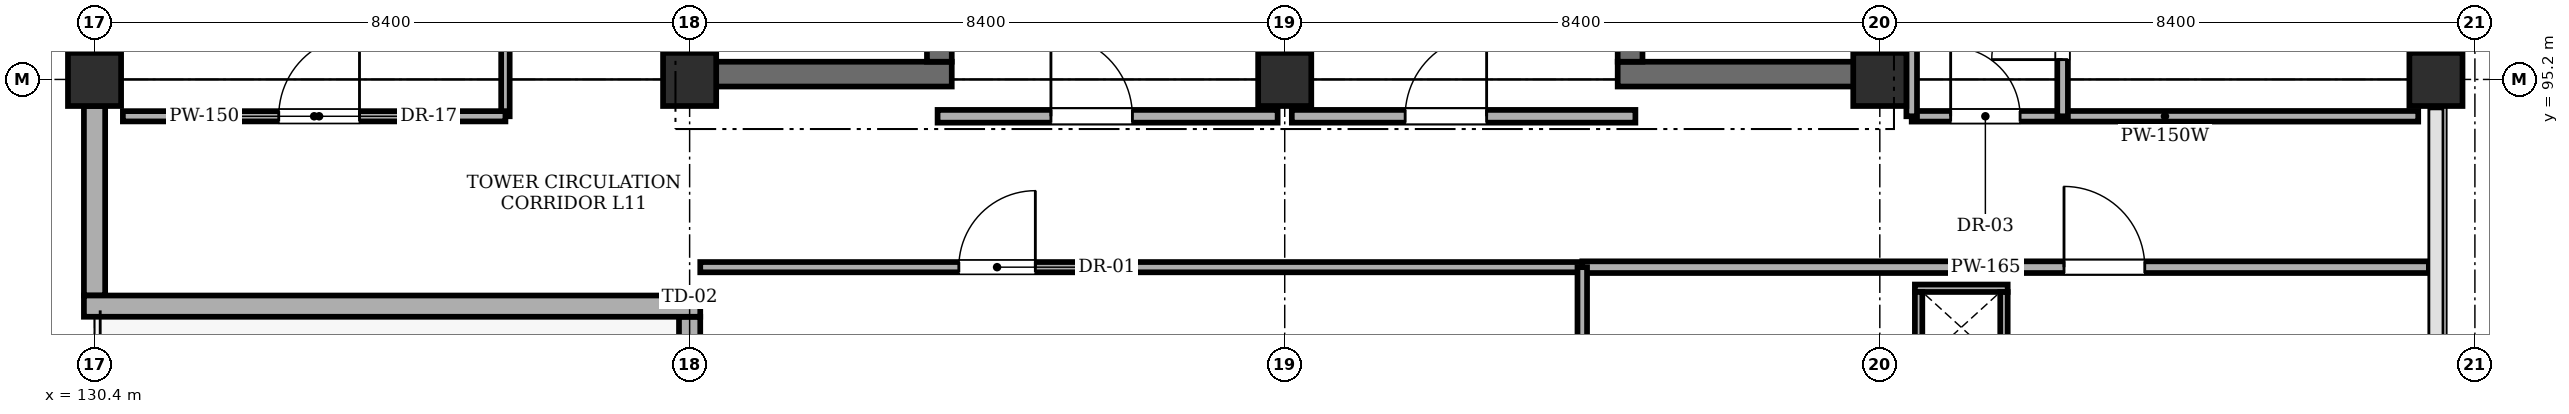
"""IFC4 building model, lengths in metres.
Left out: names, types, materials, properties, quantities, classifications, styles, units other than length and angle.
Written with IfcOpenShell. Run it as: python <this file> out.ifc"""

import sys

from ifc_helpers import new_model, si_unit, direction, frame, frame_2d, origin, origin_2d, place, context, subcontext, project, spatial, rectangle, extrude, element, fill, save


model = new_model("IFC4")
c1 = context("Model", 3, precision=1e-05, world=origin(), true_north=direction((0.0, 1.0)))
c2 = subcontext(c1, "Body", "Model", "MODEL_VIEW")
j1 = project(units=[si_unit("LENGTHUNIT", "METRE"), si_unit("PLANEANGLEUNIT", "RADIAN")], contexts=[c1])
p1 = place(None, origin())
s1 = spatial("IfcSite", under=j1, at=p1, CompositionType="ELEMENT")
p2 = place(p1, origin())
s2 = spatial("IfcBuilding", under=s1, at=p2, CompositionType="ELEMENT")
p3 = place(p2, frame((0.0, 0.0, 44.4)))
s3 = spatial("IfcBuildingStorey", under=s2, at=p3, CompositionType="ELEMENT", Elevation=44.4)
for number, where, z_axis, x_axis in (
    (1, (130.4, 95.2, 0.0), (0.0, 0.0, 1.0), (1.0, 0.0, 0.0)),
    (2, (138.8, 95.2, 0.0), (0.0, 0.0, 1.0), (1.0, 0.0, 0.0)),
    (3, (147.2, 95.2, 0.0), (0.0, 0.0, 1.0), (1.0, 0.0, 0.0)),
    (4, (155.6, 95.2, 0.0), (0.0, 0.0, 1.0), (1.0, 0.0, 0.0)),
    (5, (163.45, 95.2, 0.0), (0.0, 0.0, 1.0), (1.0, 0.0, 0.0)),
):
    element("IfcColumn", number, at=place(p3, frame(where, z_axis=z_axis, x_axis=x_axis)), inside=s3, PredefinedType="COLUMN", context=c2, shape_type="SweptSolid", body=[
        extrude(rectangle(XDim=0.75, YDim=0.75, at=origin_2d()), origin(), (0.0, 0.0, 1.0), 4.01),
    ])
p4 = place(p3, frame((138.7, 95.275, 0.0), z_axis=(0.0, 0.0, 1.0), x_axis=(1.0, 0.0, 0.0)))
e6 = element("IfcWall", 6, at=p4, inside=s3, PredefinedType="SHEAR", context=c2, shape_type="SweptSolid", body=[
    extrude(rectangle(XDim=3.8, YDim=0.35, at=frame_2d((1.9, 0.0))), origin(), (0.0, 0.0, 1.0), 4.01),
])
p5 = place(p3, frame((138.875, 95.45, 0.0), z_axis=(0.0, 0.0, 1.0), x_axis=(0.0, 1.0, 0.0)))
e7 = element("IfcWall", 7, at=p5, inside=s3, PredefinedType="SHEAR", context=c2, shape_type="SweptSolid", body=[
    extrude(rectangle(XDim=7.9, YDim=0.35, at=frame_2d((3.95, 0.0))), origin(), (0.0, 0.0, 1.0), 4.01),
])
p6 = place(p3, frame((142.325, 95.45, 0.0), z_axis=(0.0, 0.0, 1.0), x_axis=(0.0, 1.0, 0.0)))
e8 = element("IfcWall", 8, at=p6, inside=s3, PredefinedType="SHEAR", context=c2, shape_type="SweptSolid", body=[
    extrude(rectangle(XDim=7.9, YDim=0.35, at=frame_2d((3.95, 0.0))), origin(), (0.0, 0.0, 1.0), 4.01),
])
p7 = place(p6, frame((0.22, 0.0, 0.0)))
e9 = element("IfcOpeningElement", 9, at=p7, cuts=e8, PredefinedType="OPENING", context=c2, shape_type="SweptSolid", body=[
    extrude(rectangle(XDim=1.15, YDim=2.15, at=frame_2d((0.575, 1.075))), frame((0.0, 0.185, 0.0), z_axis=(0.0, -1.0, 0.0), x_axis=(1.0, 0.0, 0.0)), (0.0, 0.0, 1.0), 0.37),
])
p8 = place(p3, frame((151.9, 95.275, 0.0), z_axis=(0.0, 0.0, 1.0), x_axis=(1.0, 0.0, 0.0)))
e10 = element("IfcWall", 10, at=p8, inside=s3, PredefinedType="SHEAR", context=c2, shape_type="SweptSolid", body=[
    extrude(rectangle(XDim=3.8, YDim=0.35, at=frame_2d((1.9, 0.0))), origin(), (0.0, 0.0, 1.0), 4.01),
])
p9 = place(p3, frame((152.075, 95.45, 0.0), z_axis=(0.0, 0.0, 1.0), x_axis=(0.0, 1.0, 0.0)))
e11 = element("IfcWall", 11, at=p9, inside=s3, PredefinedType="SHEAR", context=c2, shape_type="SweptSolid", body=[
    extrude(rectangle(XDim=7.9, YDim=0.35, at=frame_2d((3.95, 0.0))), origin(), (0.0, 0.0, 1.0), 4.01),
])
p10 = place(p9, frame((0.35, 0.0, 0.0)))
e12 = element("IfcOpeningElement", 12, at=p10, cuts=e11, PredefinedType="OPENING", context=c2, shape_type="SweptSolid", body=[
    extrude(rectangle(XDim=1.15, YDim=2.15, at=frame_2d((0.575, 1.075))), frame((0.0, 0.185, 0.0), z_axis=(0.0, -1.0, 0.0), x_axis=(1.0, 0.0, 0.0)), (0.0, 0.0, 1.0), 0.37),
])
p11 = place(p3, frame((155.525, 95.45, 0.0), z_axis=(0.0, 0.0, 1.0), x_axis=(0.0, 1.0, 0.0)))
e13 = element("IfcWall", 13, at=p11, inside=s3, PredefinedType="SHEAR", context=c2, shape_type="SweptSolid", body=[
    extrude(rectangle(XDim=7.9, YDim=0.35, at=frame_2d((3.95, 0.0))), origin(), (0.0, 0.0, 1.0), 4.01),
])
p12 = place(p3, frame((163.45, 103.225, 0.0), z_axis=(0.0, 0.0, 1.0), x_axis=(0.0, -1.0, 0.0)))
e14 = element("IfcWall", 14, at=p12, inside=s3, PredefinedType="STANDARD", context=c2, shape_type="SweptSolid", body=[
    extrude(rectangle(XDim=7.65, YDim=0.3, at=frame_2d((3.825, 0.0))), origin(), (0.0, 0.0, 1.0), 3.31),
])
p13 = place(p12, frame((1.15, 0.0, 1.1)))
e15 = element("IfcOpeningElement", 15, at=p13, cuts=e14, PredefinedType="OPENING", context=c2, shape_type="SweptSolid", body=[
    extrude(rectangle(XDim=1.4, YDim=1.4, at=frame_2d((0.7, 0.7))), frame((0.0, 0.16, 0.0), z_axis=(0.0, -1.0, 0.0), x_axis=(1.0, 0.0, 0.0)), (0.0, 0.0, 1.0), 0.32),
])
p14 = place(p3, frame((130.4, 92.15, 0.0), z_axis=(0.0, 0.0, 1.0), x_axis=(0.0, 1.0, 0.0)))
e16 = element("IfcWall", 16, at=p14, inside=s3, PredefinedType="STANDARD", context=c2, shape_type="SweptSolid", body=[
    extrude(rectangle(XDim=2.675, YDim=0.3, at=frame_2d((1.337, 0.0))), origin(), (0.0, 0.0, 1.0), 4.01),
])
p15 = place(p3, frame((138.8, 87.175, 0.0), z_axis=(0.0, 0.0, 1.0), x_axis=(0.0, 1.0, 0.0)))
e17 = element("IfcWall", 17, at=p15, inside=s3, PredefinedType="STANDARD", context=c2, shape_type="SweptSolid", body=[
    extrude(rectangle(XDim=4.675, YDim=0.3, at=frame_2d((2.337, 0.0))), origin(), (0.0, 0.0, 1.0), 3.31),
])
p16 = place(p15, frame((3.175, 0.0, 0.0)))
e18 = element("IfcOpeningElement", 18, at=p16, cuts=e17, PredefinedType="OPENING", context=c2, shape_type="SweptSolid", body=[
    extrude(rectangle(XDim=1.15, YDim=2.25, at=frame_2d((0.575, 1.125))), frame((0.0, 0.16, 0.0), z_axis=(0.0, -1.0, 0.0), x_axis=(1.0, 0.0, 0.0)), (0.0, 0.0, 1.0), 0.32),
])
p17 = place(p3, frame((130.4, 95.575, 0.0), z_axis=(0.0, 0.0, 1.0), x_axis=(0.0, 1.0, 0.0)))
e19 = element("IfcWall", 19, at=p17, inside=s3, PredefinedType="STANDARD", context=c2, shape_type="SweptSolid", body=[
    extrude(rectangle(XDim=7.65, YDim=0.3, at=frame_2d((3.825, 0.0))), origin(), (0.0, 0.0, 1.0), 3.31),
])
p18 = place(p17, frame((2.4, 0.0, 1.0)))
e20 = element("IfcOpeningElement", 20, at=p18, cuts=e19, PredefinedType="OPENING", context=c2, shape_type="SweptSolid", body=[
    extrude(rectangle(XDim=1.8, YDim=1.8, at=frame_2d((0.9, 0.9))), frame((0.0, 0.16, 0.0), z_axis=(0.0, -1.0, 0.0), x_axis=(1.0, 0.0, 0.0)), (0.0, 0.0, 1.0), 0.32),
])
p19 = place(p3, frame((138.95, 92.0, 0.0), z_axis=(0.0, 0.0, 1.0), x_axis=(-1.0, 0.0, 0.0)))
e21 = element("IfcWall", 21, at=p19, inside=s3, PredefinedType="STANDARD", context=c2, shape_type="SweptSolid", body=[
    extrude(rectangle(XDim=8.7, YDim=0.3, at=frame_2d((4.35, 0.0))), origin(), (0.0, 0.0, 1.0), 4.01),
])
p20 = place(p3, frame((142.3, 94.68, 0.0), z_axis=(0.0, 0.0, 1.0), x_axis=(1.0, 0.0, 0.0)))
e22 = element("IfcWall", 22, at=p20, inside=s3, PredefinedType="STANDARD", context=c2, shape_type="SweptSolid", body=[
    extrude(rectangle(XDim=4.8, YDim=0.18, at=frame_2d((2.4, 0.0))), origin(), (0.0, 0.0, 1.0), 4.01),
])
p21 = place(p20, frame((1.6, 0.0, 0.0)))
e23 = element("IfcOpeningElement", 23, at=p21, cuts=e22, PredefinedType="OPENING", context=c2, shape_type="SweptSolid", body=[
    extrude(rectangle(XDim=1.15, YDim=2.15, at=frame_2d((0.575, 1.075))), frame((0.0, 0.1, 0.0), z_axis=(0.0, -1.0, 0.0), x_axis=(1.0, 0.0, 0.0)), (0.0, 0.0, 1.0), 0.2),
])
p22 = place(p3, frame((147.3, 94.68, 0.0), z_axis=(0.0, 0.0, 1.0), x_axis=(1.0, 0.0, 0.0)))
e24 = element("IfcWall", 24, at=p22, inside=s3, PredefinedType="STANDARD", context=c2, shape_type="SweptSolid", body=[
    extrude(rectangle(XDim=4.85, YDim=0.18, at=frame_2d((2.425, 0.0))), origin(), (0.0, 0.0, 1.0), 4.01),
])
p23 = place(p22, frame((1.6, 0.0, 0.0)))
e25 = element("IfcOpeningElement", 25, at=p23, cuts=e24, PredefinedType="OPENING", context=c2, shape_type="SweptSolid", body=[
    extrude(rectangle(XDim=1.15, YDim=2.15, at=frame_2d((0.575, 1.075))), frame((0.0, 0.1, 0.0), z_axis=(0.0, -1.0, 0.0), x_axis=(1.0, 0.0, 0.0)), (0.0, 0.0, 1.0), 0.2),
])
p24 = place(p3, frame((156.05, 94.68, 0.0), z_axis=(0.0, 0.0, 1.0), x_axis=(1.0, 0.0, 0.0)))
e26 = element("IfcWall", 26, at=p24, inside=s3, PredefinedType="PARTITIONING", context=c2, shape_type="SweptSolid", body=[
    extrude(rectangle(XDim=7.15, YDim=0.15, at=frame_2d((3.575, 0.0))), origin(), (0.0, 0.0, 1.0), 4.01),
])
p25 = place(p24, frame((0.55, 0.0, 0.0)))
e27 = element("IfcOpeningElement", 27, at=p25, cuts=e26, PredefinedType="OPENING", context=c2, shape_type="SweptSolid", body=[
    extrude(rectangle(XDim=0.98, YDim=2.12, at=frame_2d((0.49, 1.06))), frame((0.0, 0.085, 0.0), z_axis=(0.0, -1.0, 0.0), x_axis=(1.0, 0.0, 0.0)), (0.0, 0.0, 1.0), 0.17),
])
p26 = place(p3, frame((158.18, 94.68, 0.0), z_axis=(0.0, 0.0, 1.0), x_axis=(0.0, 1.0, 0.0)))
e28 = element("IfcWall", 28, at=p26, inside=s3, PredefinedType="PARTITIONING", context=c2, shape_type="SweptSolid", body=[
    extrude(rectangle(XDim=8.57, YDim=0.15, at=frame_2d((4.285, 0.0))), origin(), (0.0, 0.0, 1.0), 4.01),
])
p27 = place(p26, frame((0.8, 0.0, 0.0)))
e29 = element("IfcOpeningElement", 29, at=p27, cuts=e28, PredefinedType="OPENING", context=c2, shape_type="SweptSolid", body=[
    extrude(rectangle(XDim=1.0, YDim=2.12, at=frame_2d((0.5, 1.06))), frame((0.0, 0.085, 0.0), z_axis=(0.0, -1.0, 0.0), x_axis=(1.0, 0.0, 0.0)), (0.0, 0.0, 1.0), 0.17),
])
p28 = place(p26, frame((3.5, 0.0, 0.0)))
e30 = element("IfcOpeningElement", 30, at=p28, cuts=e28, PredefinedType="OPENING", context=c2, shape_type="SweptSolid", body=[
    extrude(rectangle(XDim=0.92, YDim=2.1, at=frame_2d((0.46, 1.05))), frame((0.0, 0.085, 0.0), z_axis=(0.0, -1.0, 0.0), x_axis=(1.0, 0.0, 0.0)), (0.0, 0.0, 1.0), 0.17),
])
p29 = place(p26, frame((6.4, 0.0, 0.0)))
e31 = element("IfcOpeningElement", 31, at=p29, cuts=e28, PredefinedType="OPENING", context=c2, shape_type="SweptSolid", body=[
    extrude(rectangle(XDim=0.92, YDim=2.1, at=frame_2d((0.46, 1.05))), frame((0.0, 0.085, 0.0), z_axis=(0.0, -1.0, 0.0), x_axis=(1.0, 0.0, 0.0)), (0.0, 0.0, 1.0), 0.17),
])
p30 = place(p3, frame((156.05, 94.68, 0.0), z_axis=(0.0, 0.0, 1.0), x_axis=(0.0, 1.0, 0.0)))
e32 = element("IfcWall", 32, at=p30, inside=s3, PredefinedType="PARTITIONING", context=c2, shape_type="SweptSolid", body=[
    extrude(rectangle(XDim=8.57, YDim=0.15, at=frame_2d((4.285, 0.0))), origin(), (0.0, 0.0, 1.0), 4.01),
])
p31 = place(p3, frame((136.2, 94.68, 0.0), z_axis=(0.0, 0.0, 1.0), x_axis=(0.0, 1.0, 0.0)))
e33 = element("IfcWall", 33, at=p31, inside=s3, PredefinedType="PARTITIONING", context=c2, shape_type="SweptSolid", body=[
    extrude(rectangle(XDim=9.07, YDim=0.12, at=frame_2d((4.535, 0.0))), origin(), (0.0, 0.0, 1.0), 4.01),
])
p32 = place(p3, frame((130.8, 94.68, 0.0), z_axis=(0.0, 0.0, 1.0), x_axis=(1.0, 0.0, 0.0)))
e34 = element("IfcWall", 34, at=p32, inside=s3, PredefinedType="PARTITIONING", context=c2, shape_type="SweptSolid", body=[
    extrude(rectangle(XDim=5.4, YDim=0.145, at=frame_2d((2.7, 0.0))), origin(), (0.0, 0.0, 1.0), 4.01),
])
p33 = place(p32, frame((2.2, 0.0, 0.0)))
e35 = element("IfcOpeningElement", 35, at=p33, cuts=e34, PredefinedType="OPENING", context=c2, shape_type="SweptSolid", body=[
    extrude(rectangle(XDim=1.14, YDim=2.18, at=frame_2d((0.57, 1.09))), frame((0.0, 0.083, 0.0), z_axis=(0.0, -1.0, 0.0), x_axis=(1.0, 0.0, 0.0)), (0.0, 0.0, 1.0), 0.165),
])
p34 = place(p3, frame((138.95, 92.55, 0.0), z_axis=(0.0, 0.0, 1.0), x_axis=(1.0, 0.0, 0.0)))
e36 = element("IfcWall", 36, at=p34, inside=s3, PredefinedType="PARTITIONING", context=c2, shape_type="SweptSolid", body=[
    extrude(rectangle(XDim=12.45, YDim=0.145, at=frame_2d((6.225, 0.0))), origin(), (0.0, 0.0, 1.0), 4.01),
])
p35 = place(p34, frame((3.65, 0.0, 0.0)))
e37 = element("IfcOpeningElement", 37, at=p35, cuts=e36, PredefinedType="OPENING", context=c2, shape_type="SweptSolid", body=[
    extrude(rectangle(XDim=1.08, YDim=2.15, at=frame_2d((0.54, 1.075))), frame((0.0, 0.083, 0.0), z_axis=(0.0, -1.0, 0.0), x_axis=(1.0, 0.0, 0.0)), (0.0, 0.0, 1.0), 0.165),
])
p36 = place(p3, frame((151.4, 92.55, 0.0), z_axis=(0.0, 0.0, 1.0), x_axis=(1.0, 0.0, 0.0)))
e38 = element("IfcWall", 38, at=p36, inside=s3, PredefinedType="PARTITIONING", context=c2, shape_type="SweptSolid", body=[
    extrude(rectangle(XDim=11.95, YDim=0.165, at=frame_2d((5.975, 0.0))), origin(), (0.0, 0.0, 1.0), 4.01),
])
p37 = place(p36, frame((6.8, 0.0, 0.0)))
e39 = element("IfcOpeningElement", 39, at=p37, cuts=e38, PredefinedType="OPENING", context=c2, shape_type="SweptSolid", body=[
    extrude(rectangle(XDim=1.14, YDim=2.18, at=frame_2d((0.57, 1.09))), frame((0.0, 0.093, 0.0), z_axis=(0.0, -1.0, 0.0), x_axis=(1.0, 0.0, 0.0)), (0.0, 0.0, 1.0), 0.185),
])
p38 = place(p3, frame((151.4, 78.55, 0.0), z_axis=(0.0, 0.0, 1.0), x_axis=(0.0, 1.0, 0.0)))
e40 = element("IfcWall", 40, at=p38, inside=s3, PredefinedType="PARTITIONING", context=c2, shape_type="SweptSolid", body=[
    extrude(rectangle(XDim=14.0, YDim=0.135, at=frame_2d((7.0, 0.0))), origin(), (0.0, 0.0, 1.0), 3.56),
])
p39 = place(p3, frame((156.095, 92.252, 0.0), z_axis=(0.0, 0.0, 1.0), x_axis=(1.0, 0.0, 0.0)))
e41 = element("IfcWall", 41, at=p39, inside=s3, PredefinedType="PARTITIONING", context=c2, shape_type="SweptSolid", body=[
    extrude(rectangle(XDim=1.31, YDim=0.105, at=frame_2d((0.655, 0.0))), origin(), (0.0, 0.0, 1.0), 4.01),
])
for number, where, z_axis, x_axis in (
    (42, (156.147, 91.2, 0.0), (0.0, 0.0, 1.0), (0.0, 1.0, 0.0)),
    (43, (157.353, 91.2, 0.0), (0.0, 0.0, 1.0), (0.0, 1.0, 0.0)),
):
    element("IfcWall", number, at=place(p3, frame(where, z_axis=z_axis, x_axis=x_axis)), inside=s3, PredefinedType="PARTITIONING", context=c2, shape_type="SweptSolid", body=[
        extrude(rectangle(XDim=1.0, YDim=0.105, at=frame_2d((0.5, 0.0))), origin(), (0.0, 0.0, 1.0), 4.01),
    ])
p40 = place(p21, origin())
e44 = element("IfcDoor", 44, at=p40, inside=s3, OperationType="SINGLE_SWING_LEFT", PredefinedType="DOOR", context=c2, shape_type="SweptSolid", body=[
    extrude(rectangle(XDim=1.15, YDim=2.15, at=frame_2d((0.575, 1.075))), frame((0.0, 0.025, 0.0), z_axis=(0.0, -1.0, 0.0), x_axis=(1.0, 0.0, 0.0)), (0.0, 0.0, 1.0), 0.05),
])
fill(e23, e44)
p41 = place(p23, origin())
e45 = element("IfcDoor", 45, at=p41, inside=s3, OperationType="SINGLE_SWING_RIGHT", PredefinedType="DOOR", context=c2, shape_type="SweptSolid", body=[
    extrude(rectangle(XDim=1.15, YDim=2.15, at=frame_2d((0.575, 1.075))), frame((0.0, 0.025, 0.0), z_axis=(0.0, -1.0, 0.0), x_axis=(1.0, 0.0, 0.0)), (0.0, 0.0, 1.0), 0.05),
])
fill(e25, e45)
p42 = place(p25, origin())
e46 = element("IfcDoor", 46, at=p42, inside=s3, OperationType="SINGLE_SWING_LEFT", PredefinedType="DOOR", context=c2, shape_type="SweptSolid", body=[
    extrude(rectangle(XDim=0.98, YDim=2.12, at=frame_2d((0.49, 1.06))), frame((0.0, 0.025, 0.0), z_axis=(0.0, -1.0, 0.0), x_axis=(1.0, 0.0, 0.0)), (0.0, 0.0, 1.0), 0.05),
])
fill(e27, e46)
p43 = place(p27, origin())
e47 = element("IfcDoor", 47, at=p43, inside=s3, OperationType="SINGLE_SWING_LEFT", PredefinedType="DOOR", context=c2, shape_type="SweptSolid", body=[
    extrude(rectangle(XDim=1.0, YDim=2.12, at=frame_2d((0.5, 1.06))), frame((0.0, 0.025, 0.0), z_axis=(0.0, -1.0, 0.0), x_axis=(1.0, 0.0, 0.0)), (0.0, 0.0, 1.0), 0.05),
])
fill(e29, e47)
p44 = place(p33, origin())
e48 = element("IfcDoor", 48, at=p44, inside=s3, OperationType="SINGLE_SWING_RIGHT", PredefinedType="DOOR", context=c2, shape_type="SweptSolid", body=[
    extrude(rectangle(XDim=1.14, YDim=2.18, at=frame_2d((0.57, 1.09))), frame((0.0, 0.025, 0.0), z_axis=(0.0, -1.0, 0.0), x_axis=(1.0, 0.0, 0.0)), (0.0, 0.0, 1.0), 0.05),
])
fill(e35, e48)
p45 = place(p35, origin())
e49 = element("IfcDoor", 49, at=p45, inside=s3, OperationType="SINGLE_SWING_RIGHT", PredefinedType="DOOR", context=c2, shape_type="SweptSolid", body=[
    extrude(rectangle(XDim=1.08, YDim=2.15, at=frame_2d((0.54, 1.075))), frame((0.0, 0.025, 0.0), z_axis=(0.0, -1.0, 0.0), x_axis=(1.0, 0.0, 0.0)), (0.0, 0.0, 1.0), 0.05),
])
fill(e37, e49)
p46 = place(p37, origin())
e50 = element("IfcDoor", 50, at=p46, inside=s3, OperationType="SINGLE_SWING_LEFT", PredefinedType="DOOR", context=c2, shape_type="SweptSolid", body=[
    extrude(rectangle(XDim=1.14, YDim=2.18, at=frame_2d((0.57, 1.09))), frame((0.0, 0.025, 0.0), z_axis=(0.0, -1.0, 0.0), x_axis=(1.0, 0.0, 0.0)), (0.0, 0.0, 1.0), 0.05),
])
fill(e39, e50)
save(model, sys.argv[1])
